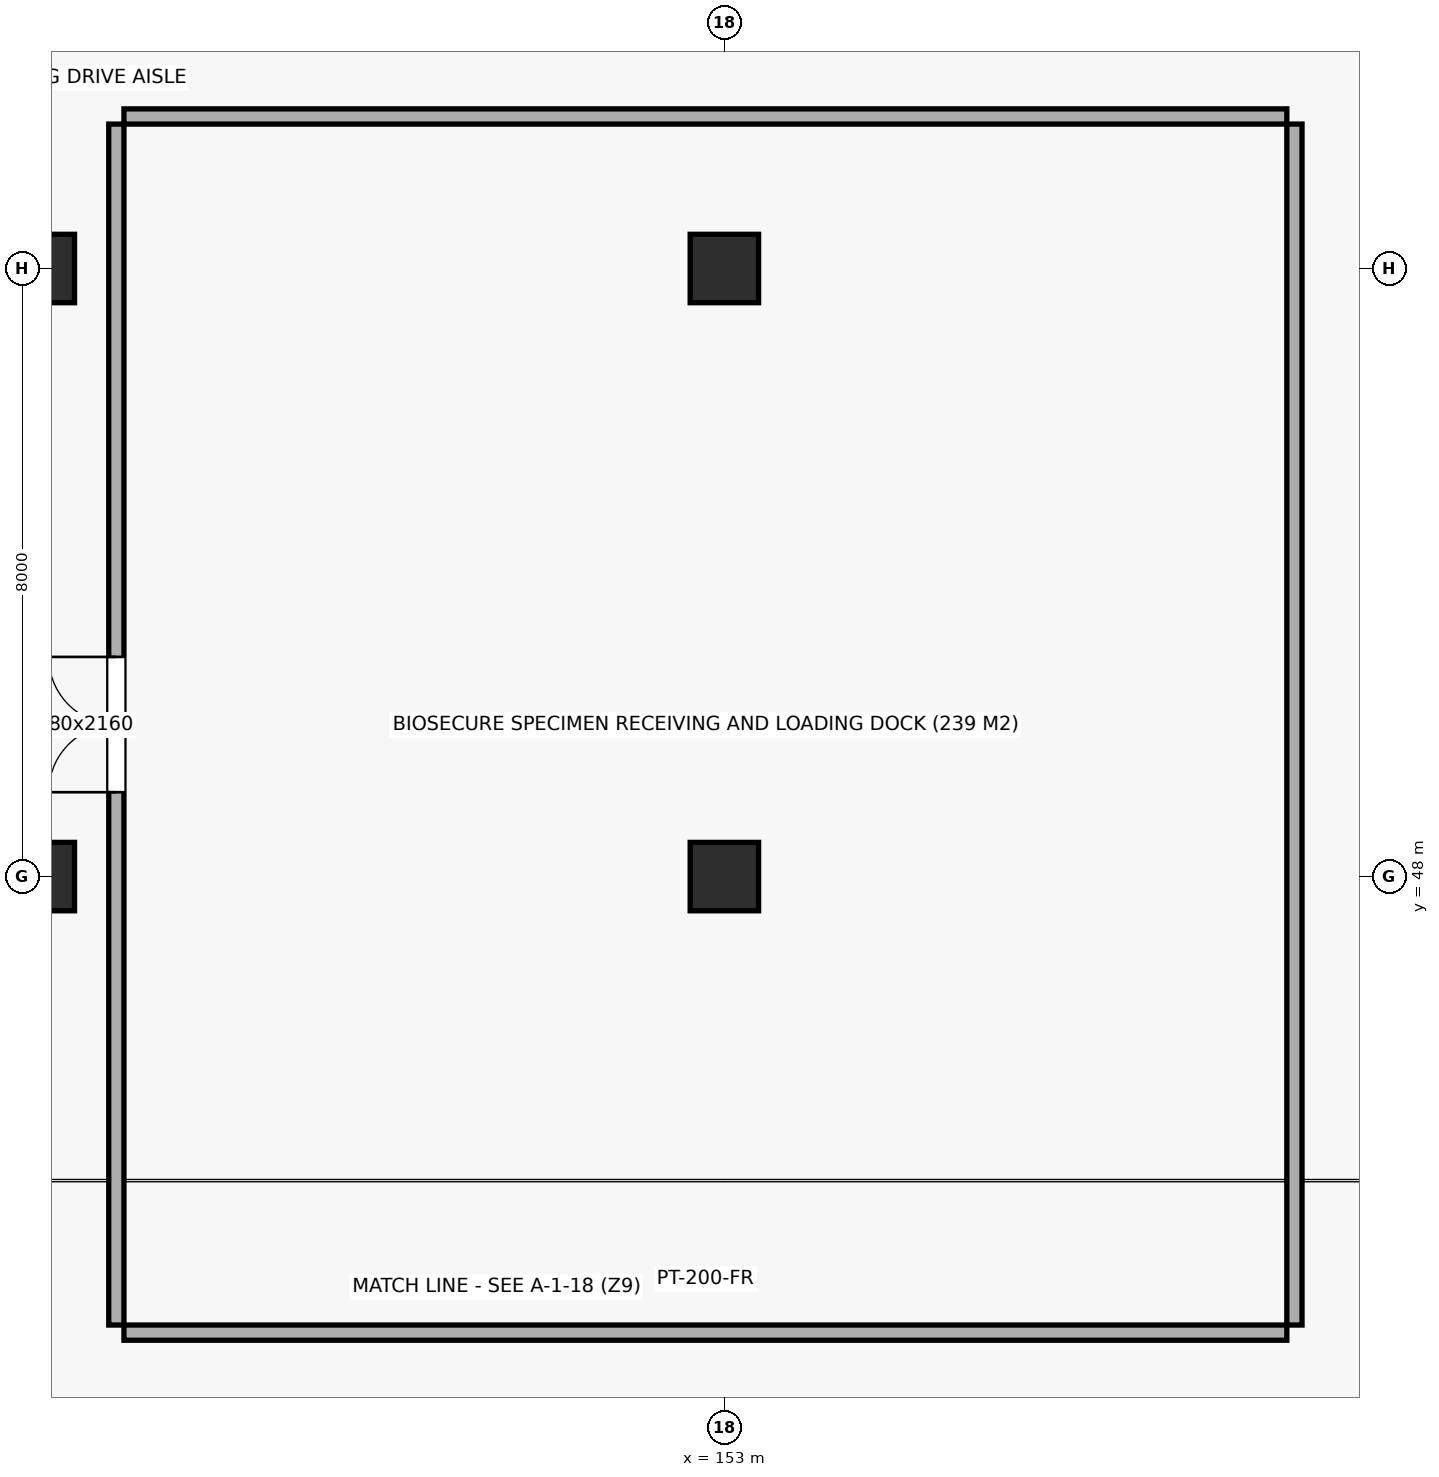
"""IFC4 building model, lengths in metres.
Left out: names, types, materials, properties, quantities, classifications, styles, units other than length and angle.
Written with IfcOpenShell. Run it as: python <this file> out.ifc"""

import sys

from ifc_helpers import new_model, si_unit, direction, frame, frame_2d, origin, origin_2d, place, context, subcontext, project, spatial, rectangle, extrude, element, fill, save


model = new_model("IFC4")
c1 = context("Model", 3, precision=1e-05, world=origin(), true_north=direction((0.0, 1.0)))
c2 = subcontext(c1, "Body", "Model", "MODEL_VIEW")
j1 = project(units=[si_unit("LENGTHUNIT", "METRE"), si_unit("PLANEANGLEUNIT", "RADIAN")], contexts=[c1])
p1 = place(None, origin())
s1 = spatial("IfcSite", under=j1, at=p1, CompositionType="ELEMENT")
p2 = place(p1, origin())
s2 = spatial("IfcBuilding", under=s1, at=p2, CompositionType="ELEMENT")
p3 = place(p2, frame((0.0, 0.0, -4.5)))
s3 = spatial("IfcBuildingStorey", under=s2, at=p3, CompositionType="ELEMENT", Elevation=-4.5)
for number, where, z_axis, x_axis in (
    (1, (144.0, 48.0, 0.0), (0.0, 0.0, 1.0), (1.0, 0.0, 0.0)),
    (2, (144.0, 56.0, 0.0), (0.0, 0.0, 1.0), (1.0, 0.0, 0.0)),
    (3, (153.0, 48.0, 0.0), (0.0, 0.0, 1.0), (1.0, 0.0, 0.0)),
    (4, (153.0, 56.0, 0.0), (0.0, 0.0, 1.0), (1.0, 0.0, 0.0)),
):
    element("IfcColumn", number, at=place(p3, frame(where, z_axis=z_axis, x_axis=x_axis)), inside=s3, PredefinedType="COLUMN", context=c2, shape_type="SweptSolid", body=[
        extrude(rectangle(XDim=0.9, YDim=0.9, at=origin_2d()), origin(), (0.0, 0.0, 1.0), 4.5),
    ])
for number, where, z_axis, x_axis in (
    (5, (145.1, 42.0, 0.0), (0.0, 0.0, 1.0), (1.0, 0.0, 0.0)),
    (6, (145.1, 58.0, 0.0), (0.0, 0.0, 1.0), (1.0, 0.0, 0.0)),
):
    element("IfcWall", number, at=place(p3, frame(where, z_axis=z_axis, x_axis=x_axis)), inside=s3, PredefinedType="PARTITIONING", context=c2, shape_type="SweptSolid", body=[
        extrude(rectangle(XDim=15.3, YDim=0.2, at=frame_2d((7.65, 0.0))), origin(), (0.0, 0.0, 1.0), 4.15),
    ])
p4 = place(p3, frame((145.0, 42.1, 0.0), z_axis=(0.0, 0.0, 1.0), x_axis=(0.0, 1.0, 0.0)))
e7 = element("IfcWall", 7, at=p4, inside=s3, PredefinedType="PARTITIONING", context=c2, shape_type="SweptSolid", body=[
    extrude(rectangle(XDim=15.8, YDim=0.2, at=frame_2d((7.9, 0.0))), origin(), (0.0, 0.0, 1.0), 4.15),
])
p5 = place(p4, frame((7.01, 0.0, 0.0)))
e8 = element("IfcOpeningElement", 8, at=p5, cuts=e7, PredefinedType="OPENING", context=c2, shape_type="SweptSolid", body=[
    extrude(rectangle(XDim=1.78, YDim=2.16, at=frame_2d((0.89, 1.08))), frame((0.0, 0.112, 0.0), z_axis=(0.0, -1.0, 0.0), x_axis=(1.0, 0.0, 0.0)), (0.0, 0.0, 1.0), 0.224),
])
p6 = place(p3, frame((160.5, 42.1, 0.0), z_axis=(0.0, 0.0, 1.0), x_axis=(0.0, 1.0, 0.0)))
e9 = element("IfcWall", 9, at=p6, inside=s3, PredefinedType="PARTITIONING", context=c2, shape_type="SweptSolid", body=[
    extrude(rectangle(XDim=15.8, YDim=0.2, at=frame_2d((7.9, 0.0))), origin(), (0.0, 0.0, 1.0), 4.15),
])
p7 = place(p5, origin())
e10 = element("IfcDoor", 10, at=p7, inside=s3, OperationType="DOUBLE_DOOR_SINGLE_SWING", PredefinedType="DOOR", context=c2, shape_type="SweptSolid", body=[
    extrude(rectangle(XDim=1.78, YDim=2.16, at=frame_2d((0.89, 1.08))), frame((0.0, 0.025, 0.0), z_axis=(0.0, -1.0, 0.0), x_axis=(1.0, 0.0, 0.0)), (0.0, 0.0, 1.0), 0.05),
])
fill(e8, e10)
save(model, sys.argv[1])
